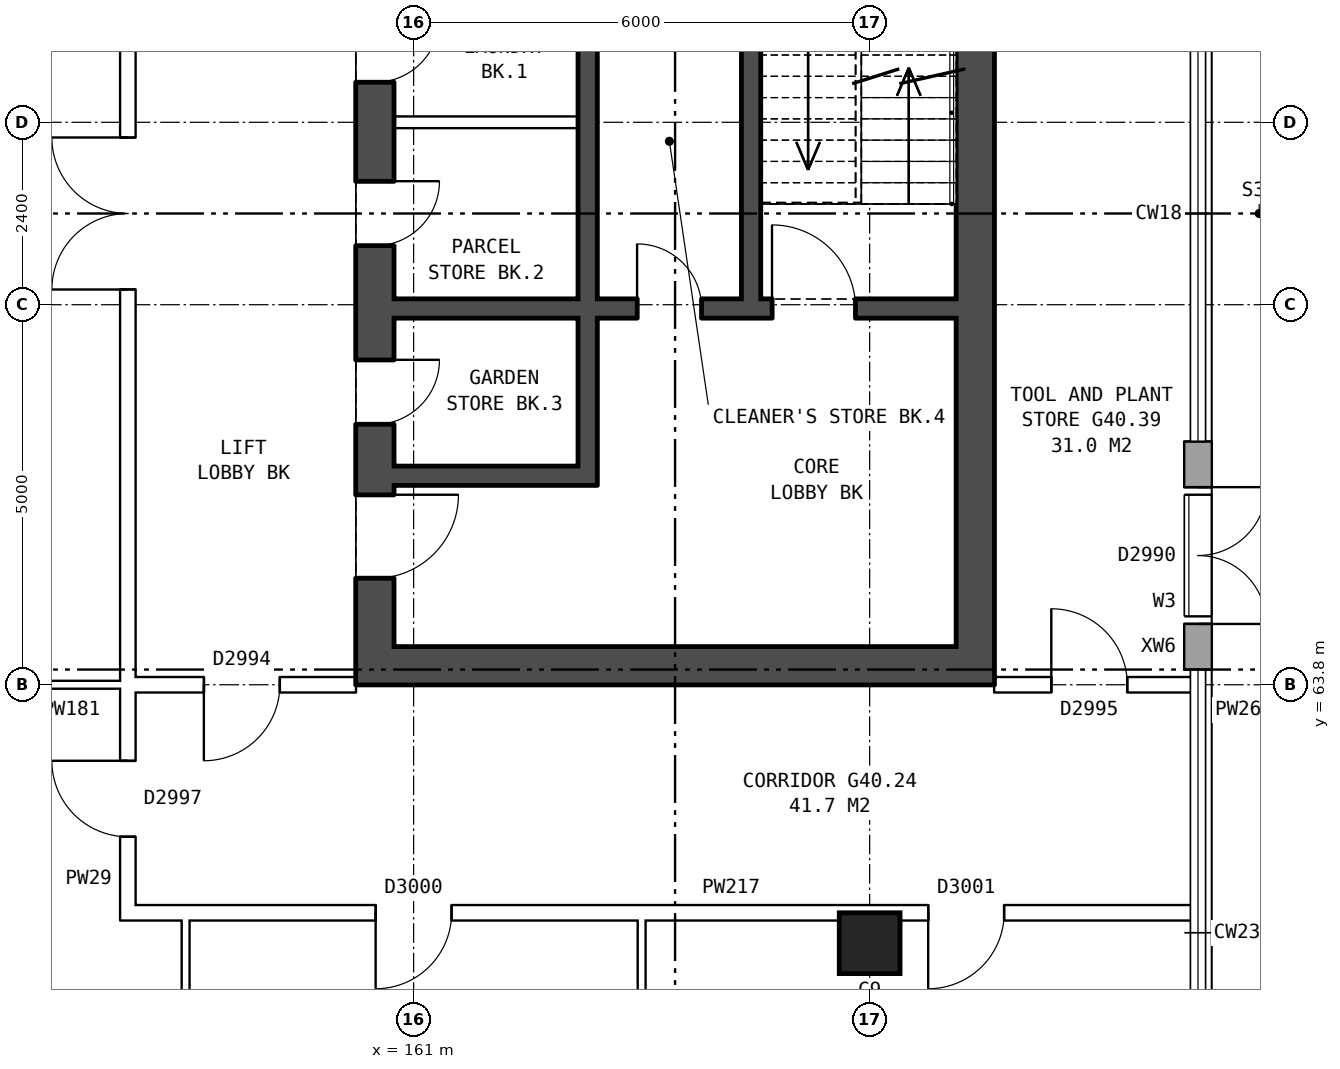
"""IFC4 building model, lengths in metres.
Left out: names, types, materials, properties, quantities, classifications, styles, units other than length and angle.
Written with IfcOpenShell. Run it as: python <this file> out.ifc"""

import sys

from ifc_helpers import new_model, si_unit, direction, frame, frame_2d, origin, origin_2d, place, context, subcontext, project, spatial, rectangle, extrude, element, fill, save


model = new_model("IFC4")
c1 = context("Model", 3, precision=1e-05, world=origin(), true_north=direction((0.0, 1.0)))
c2 = subcontext(c1, "Body", "Model", "MODEL_VIEW")
j1 = project(units=[si_unit("LENGTHUNIT", "METRE"), si_unit("PLANEANGLEUNIT", "RADIAN")], contexts=[c1])
p1 = place(None, origin())
s1 = spatial("IfcSite", under=j1, at=p1, CompositionType="ELEMENT")
p2 = place(p1, origin())
s2 = spatial("IfcBuilding", under=s1, at=p2, CompositionType="ELEMENT")
p3 = place(p2, frame((0.0, 0.0, 142.3)))
s3 = spatial("IfcBuildingStorey", under=s2, at=p3, CompositionType="ELEMENT", Elevation=142.3)
p4 = place(p3, frame((167.0, 60.4, 0.0), z_axis=(0.0, 0.0, 1.0), x_axis=(1.0, 0.0, 0.0)))
e1 = element("IfcColumn", 1, at=p4, inside=s3, PredefinedType="COLUMN", context=c2, shape_type="SweptSolid", body=[
    extrude(rectangle(XDim=0.8, YDim=0.8, at=origin_2d()), origin(), (0.0, 0.0, 1.0), 5.6),
])
p5 = place(p3, frame((171.32, 64.0, 0.0), z_axis=(0.0, 0.0, 1.0), x_axis=(0.0, 1.0, 0.0)))
e2 = element("IfcWall", 2, at=p5, inside=s3, PredefinedType="STANDARD", context=c2, shape_type="SweptSolid", body=[
    extrude(rectangle(XDim=3.0, YDim=0.36, at=frame_2d((1.5, 0.0))), origin(), (0.0, 0.0, 1.0), 5.6),
])
p6 = place(p5, frame((0.7, 0.0, 3.4)))
e3 = element("IfcOpeningElement", 3, at=p6, cuts=e2, PredefinedType="OPENING", context=c2, shape_type="SweptSolid", body=[
    extrude(rectangle(XDim=1.6, YDim=1.2, at=frame_2d((0.8, 0.6))), frame((0.0, 0.19, 0.0), z_axis=(0.0, -1.0, 0.0), x_axis=(1.0, 0.0, 0.0)), (0.0, 0.0, 1.0), 0.38),
])
p7 = place(p5, frame((0.6, 0.0, 0.0)))
e4 = element("IfcOpeningElement", 4, at=p7, cuts=e2, PredefinedType="OPENING", context=c2, shape_type="SweptSolid", body=[
    extrude(rectangle(XDim=1.8, YDim=2.4, at=frame_2d((0.9, 1.2))), frame((0.0, 0.19, 0.0), z_axis=(0.0, -1.0, 0.0), x_axis=(1.0, 0.0, 0.0)), (0.0, 0.0, 1.0), 0.38),
])
p8 = place(p3, frame((160.49, 76.2, 0.0), z_axis=(0.0, 0.0, 1.0), x_axis=(0.0, -1.0, 0.0)))
e5 = element("IfcWall", 5, at=p8, inside=s3, PredefinedType="SHEAR", context=c2, shape_type="SweptSolid", body=[
    extrude(rectangle(XDim=12.4, YDim=0.5, at=frame_2d((6.2, 0.0))), origin(), (0.0, 0.0, 1.0), 5.6),
])
p9 = place(p8, frame((1.325, 0.0, 0.0)))
e6 = element("IfcOpeningElement", 6, at=p9, cuts=e5, PredefinedType="OPENING", context=c2, shape_type="SweptSolid", body=[
    extrude(rectangle(XDim=1.1, YDim=2.1, at=frame_2d((0.55, 1.05))), frame((0.0, 0.26, 0.0), z_axis=(0.0, -1.0, 0.0), x_axis=(1.0, 0.0, 0.0)), (0.0, 0.0, 1.0), 0.52),
])
p10 = place(p8, frame((3.625, 0.0, 0.0)))
e7 = element("IfcOpeningElement", 7, at=p10, cuts=e5, PredefinedType="OPENING", context=c2, shape_type="SweptSolid", body=[
    extrude(rectangle(XDim=0.85, YDim=2.1, at=frame_2d((0.425, 1.05))), frame((0.0, 0.26, 0.0), z_axis=(0.0, -1.0, 0.0), x_axis=(1.0, 0.0, 0.0)), (0.0, 0.0, 1.0), 0.52),
])
p11 = place(p8, frame((5.775, 0.0, 0.0)))
e8 = element("IfcOpeningElement", 8, at=p11, cuts=e5, PredefinedType="OPENING", context=c2, shape_type="SweptSolid", body=[
    extrude(rectangle(XDim=0.85, YDim=2.1, at=frame_2d((0.425, 1.05))), frame((0.0, 0.26, 0.0), z_axis=(0.0, -1.0, 0.0), x_axis=(1.0, 0.0, 0.0)), (0.0, 0.0, 1.0), 0.52),
])
p12 = place(p8, frame((9.9, 0.0, 0.0)))
e9 = element("IfcOpeningElement", 9, at=p12, cuts=e5, PredefinedType="OPENING", context=c2, shape_type="SweptSolid", body=[
    extrude(rectangle(XDim=1.1, YDim=2.1, at=frame_2d((0.55, 1.05))), frame((0.0, 0.26, 0.0), z_axis=(0.0, -1.0, 0.0), x_axis=(1.0, 0.0, 0.0)), (0.0, 0.0, 1.0), 0.52),
])
p13 = place(p8, frame((8.125, 0.0, 0.0)))
e10 = element("IfcOpeningElement", 10, at=p13, cuts=e5, PredefinedType="OPENING", context=c2, shape_type="SweptSolid", body=[
    extrude(rectangle(XDim=0.85, YDim=2.1, at=frame_2d((0.425, 1.05))), frame((0.0, 0.26, 0.0), z_axis=(0.0, -1.0, 0.0), x_axis=(1.0, 0.0, 0.0)), (0.0, 0.0, 1.0), 0.52),
])
p14 = place(p3, frame((168.39, 76.2, 0.0), z_axis=(0.0, 0.0, 1.0), x_axis=(0.0, -1.0, 0.0)))
e11 = element("IfcWall", 11, at=p14, inside=s3, PredefinedType="SHEAR", context=c2, shape_type="SweptSolid", body=[
    extrude(rectangle(XDim=12.4, YDim=0.5, at=frame_2d((6.2, 0.0))), origin(), (0.0, 0.0, 1.0), 5.6),
])
p15 = place(p3, frame((160.74, 64.05, 0.0), z_axis=(0.0, 0.0, 1.0), x_axis=(1.0, 0.0, 0.0)))
e12 = element("IfcWall", 12, at=p15, inside=s3, PredefinedType="SHEAR", context=c2, shape_type="SweptSolid", body=[
    extrude(rectangle(XDim=7.4, YDim=0.5, at=frame_2d((3.7, 0.0))), origin(), (0.0, 0.0, 1.0), 5.6),
])
p16 = place(p3, frame((160.74, 71.2, 0.0), z_axis=(0.0, 0.0, 1.0), x_axis=(1.0, 0.0, 0.0)))
e13 = element("IfcWall", 13, at=p16, inside=s3, PredefinedType="PARTITIONING", context=c2, shape_type="SweptSolid", body=[
    extrude(rectangle(XDim=2.425, YDim=0.15, at=frame_2d((1.212, 0.0))), origin(), (0.0, 0.0, 1.0), 5.6),
])
p17 = place(p3, frame((160.74, 68.75, 0.0), z_axis=(0.0, 0.0, 1.0), x_axis=(1.0, 0.0, 0.0)))
e14 = element("IfcWall", 14, at=p17, inside=s3, PredefinedType="SHEAR", context=c2, shape_type="SweptSolid", body=[
    extrude(rectangle(XDim=7.4, YDim=0.25, at=frame_2d((3.7, 0.0))), origin(), (0.0, 0.0, 1.0), 5.6),
])
p18 = place(p17, frame((4.975, 0.0, 0.0)))
e15 = element("IfcOpeningElement", 15, at=p18, cuts=e14, PredefinedType="OPENING", context=c2, shape_type="SweptSolid", body=[
    extrude(rectangle(XDim=1.1, YDim=2.1, at=frame_2d((0.55, 1.05))), frame((0.0, 0.135, 0.0), z_axis=(0.0, -1.0, 0.0), x_axis=(1.0, 0.0, 0.0)), (0.0, 0.0, 1.0), 0.27),
])
p19 = place(p17, frame((3.2, 0.0, 0.0)))
e16 = element("IfcOpeningElement", 16, at=p19, cuts=e14, PredefinedType="OPENING", context=c2, shape_type="SweptSolid", body=[
    extrude(rectangle(XDim=0.85, YDim=2.1, at=frame_2d((0.425, 1.05))), frame((0.0, 0.135, 0.0), z_axis=(0.0, -1.0, 0.0), x_axis=(1.0, 0.0, 0.0)), (0.0, 0.0, 1.0), 0.27),
])
p20 = place(p3, frame((160.74, 66.55, 0.0), z_axis=(0.0, 0.0, 1.0), x_axis=(1.0, 0.0, 0.0)))
e17 = element("IfcWall", 17, at=p20, inside=s3, PredefinedType="SHEAR", context=c2, shape_type="SweptSolid", body=[
    extrude(rectangle(XDim=2.425, YDim=0.25, at=frame_2d((1.212, 0.0))), origin(), (0.0, 0.0, 1.0), 5.6),
])
p21 = place(p3, frame((163.29, 73.025, 0.0), z_axis=(0.0, 0.0, 1.0), x_axis=(0.0, -1.0, 0.0)))
e18 = element("IfcWall", 18, at=p21, inside=s3, PredefinedType="SHEAR", context=c2, shape_type="SweptSolid", body=[
    extrude(rectangle(XDim=4.15, YDim=0.25, at=frame_2d((2.075, 0.0))), origin(), (0.0, 0.0, 1.0), 5.6),
])
p22 = place(p3, frame((163.29, 68.625, 0.0), z_axis=(0.0, 0.0, 1.0), x_axis=(0.0, -1.0, 0.0)))
e19 = element("IfcWall", 19, at=p22, inside=s3, PredefinedType="SHEAR", context=c2, shape_type="SweptSolid", body=[
    extrude(rectangle(XDim=2.2, YDim=0.25, at=frame_2d((1.1, 0.0))), origin(), (0.0, 0.0, 1.0), 5.6),
])
p23 = place(p3, frame((165.44, 75.7, 0.0), z_axis=(0.0, 0.0, 1.0), x_axis=(0.0, -1.0, 0.0)))
e20 = element("IfcWall", 20, at=p23, inside=s3, PredefinedType="SHEAR", context=c2, shape_type="SweptSolid", body=[
    extrude(rectangle(XDim=6.825, YDim=0.25, at=frame_2d((3.413, 0.0))), origin(), (0.0, 0.0, 1.0), 5.6),
])
p24 = place(p3, frame((157.24, 63.9, 0.0), z_axis=(0.0, 0.0, 1.0), x_axis=(0.0, 1.0, 0.0)))
e21 = element("IfcWall", 21, at=p24, inside=s3, PredefinedType="PARTITIONING", context=c2, shape_type="SweptSolid", body=[
    extrude(rectangle(XDim=12.2, YDim=0.2, at=frame_2d((6.1, 0.0))), origin(), (0.0, 0.0, 1.0), 5.6),
])
p25 = place(p24, frame((5.1, 0.0, 0.0)))
e22 = element("IfcOpeningElement", 22, at=p25, cuts=e21, PredefinedType="OPENING", context=c2, shape_type="SweptSolid", body=[
    extrude(rectangle(XDim=2.0, YDim=2.1, at=frame_2d((1.0, 1.05))), frame((0.0, 0.11, 0.0), z_axis=(0.0, -1.0, 0.0), x_axis=(1.0, 0.0, 0.0)), (0.0, 0.0, 1.0), 0.22),
])
p26 = place(p3, frame((157.14, 60.8, 0.0), z_axis=(0.0, 0.0, 1.0), x_axis=(1.0, 0.0, 0.0)))
e23 = element("IfcWall", 23, at=p26, inside=s3, PredefinedType="PARTITIONING", context=c2, shape_type="SweptSolid", body=[
    extrude(rectangle(XDim=14.12, YDim=0.2, at=frame_2d((7.06, 0.0))), origin(), (0.0, 0.0, 1.0), 5.6),
])
p27 = place(p26, frame((3.36, 0.0, 0.0)))
e24 = element("IfcOpeningElement", 24, at=p27, cuts=e23, PredefinedType="OPENING", context=c2, shape_type="SweptSolid", body=[
    extrude(rectangle(XDim=1.0, YDim=2.1, at=frame_2d((0.5, 1.05))), frame((0.0, 0.11, 0.0), z_axis=(0.0, -1.0, 0.0), x_axis=(1.0, 0.0, 0.0)), (0.0, 0.0, 1.0), 0.22),
])
p28 = place(p26, frame((10.63, 0.0, 0.0)))
e25 = element("IfcOpeningElement", 25, at=p28, cuts=e23, PredefinedType="OPENING", context=c2, shape_type="SweptSolid", body=[
    extrude(rectangle(XDim=1.0, YDim=2.1, at=frame_2d((0.5, 1.05))), frame((0.0, 0.11, 0.0), z_axis=(0.0, -1.0, 0.0), x_axis=(1.0, 0.0, 0.0)), (0.0, 0.0, 1.0), 0.22),
])
p29 = place(p3, frame((168.64, 63.8, 0.0), z_axis=(0.0, 0.0, 1.0), x_axis=(1.0, 0.0, 0.0)))
e26 = element("IfcWall", 26, at=p29, inside=s3, PredefinedType="PARTITIONING", context=c2, shape_type="SweptSolid", body=[
    extrude(rectangle(XDim=2.62, YDim=0.2, at=frame_2d((1.31, 0.0))), origin(), (0.0, 0.0, 1.0), 5.6),
])
p30 = place(p29, frame((0.75, 0.0, 0.0)))
e27 = element("IfcOpeningElement", 27, at=p30, cuts=e26, PredefinedType="OPENING", context=c2, shape_type="SweptSolid", body=[
    extrude(rectangle(XDim=1.0, YDim=2.1, at=frame_2d((0.5, 1.05))), frame((0.0, 0.11, 0.0), z_axis=(0.0, -1.0, 0.0), x_axis=(1.0, 0.0, 0.0)), (0.0, 0.0, 1.0), 0.22),
])
p31 = place(p3, frame((157.14, 63.8, 0.0), z_axis=(0.0, 0.0, 1.0), x_axis=(1.0, 0.0, 0.0)))
e28 = element("IfcWall", 28, at=p31, inside=s3, PredefinedType="PARTITIONING", context=c2, shape_type="SweptSolid", body=[
    extrude(rectangle(XDim=3.1, YDim=0.2, at=frame_2d((1.55, 0.0))), origin(), (0.0, 0.0, 1.0), 5.6),
])
p32 = place(p31, frame((1.1, 0.0, 0.0)))
e29 = element("IfcOpeningElement", 29, at=p32, cuts=e28, PredefinedType="OPENING", context=c2, shape_type="SweptSolid", body=[
    extrude(rectangle(XDim=1.0, YDim=2.1, at=frame_2d((0.5, 1.05))), frame((0.0, 0.11, 0.0), z_axis=(0.0, -1.0, 0.0), x_axis=(1.0, 0.0, 0.0)), (0.0, 0.0, 1.0), 0.22),
])
p33 = place(p3, frame((142.66, 63.8, 0.0), z_axis=(0.0, 0.0, 1.0), x_axis=(1.0, 0.0, 0.0)))
e30 = element("IfcWall", 30, at=p33, inside=s3, PredefinedType="PARTITIONING", context=c2, shape_type="SweptSolid", body=[
    extrude(rectangle(XDim=14.68, YDim=0.1, at=frame_2d((7.34, 0.0))), origin(), (0.0, 0.0, 1.0), 5.6),
])
p34 = place(p33, frame((3.22, 0.0, 0.0)))
e31 = element("IfcOpeningElement", 31, at=p34, cuts=e30, PredefinedType="OPENING", context=c2, shape_type="SweptSolid", body=[
    extrude(rectangle(XDim=1.0, YDim=2.1, at=frame_2d((0.5, 1.05))), frame((0.0, 0.06, 0.0), z_axis=(0.0, -1.0, 0.0), x_axis=(1.0, 0.0, 0.0)), (0.0, 0.0, 1.0), 0.12),
])
p35 = place(p33, frame((10.46, 0.0, 0.0)))
e32 = element("IfcOpeningElement", 32, at=p35, cuts=e30, PredefinedType="OPENING", context=c2, shape_type="SweptSolid", body=[
    extrude(rectangle(XDim=1.0, YDim=2.1, at=frame_2d((0.5, 1.05))), frame((0.0, 0.06, 0.0), z_axis=(0.0, -1.0, 0.0), x_axis=(1.0, 0.0, 0.0)), (0.0, 0.0, 1.0), 0.12),
])
p36 = place(p3, frame((157.24, 60.7, 0.0), z_axis=(0.0, 0.0, 1.0), x_axis=(0.0, 1.0, 0.0)))
e33 = element("IfcWall", 33, at=p36, inside=s3, PredefinedType="PARTITIONING", context=c2, shape_type="SweptSolid", body=[
    extrude(rectangle(XDim=3.2, YDim=0.2, at=frame_2d((1.6, 0.0))), origin(), (0.0, 0.0, 1.0), 5.6),
])
p37 = place(p36, frame((1.1, 0.0, 0.0)))
e34 = element("IfcOpeningElement", 34, at=p37, cuts=e33, PredefinedType="OPENING", context=c2, shape_type="SweptSolid", body=[
    extrude(rectangle(XDim=1.0, YDim=2.1, at=frame_2d((0.5, 1.05))), frame((0.0, 0.11, 0.0), z_axis=(0.0, -1.0, 0.0), x_axis=(1.0, 0.0, 0.0)), (0.0, 0.0, 1.0), 0.22),
])
for number, where, z_axis, x_axis in (
    (35, (158.0, 54.24, 0.0), (0.0, 0.0, 1.0), (0.0, 1.0, 0.0)),
    (36, (164.0, 54.24, 0.0), (0.0, 0.0, 1.0), (0.0, 1.0, 0.0)),
):
    element("IfcWall", number, at=place(p3, frame(where, z_axis=z_axis, x_axis=x_axis)), inside=s3, PredefinedType="PARTITIONING", context=c2, shape_type="SweptSolid", body=[
        extrude(rectangle(XDim=6.66, YDim=0.1, at=frame_2d((3.33, 0.0))), origin(), (0.0, 0.0, 1.0), 5.6),
    ])
p38 = place(p6, origin())
e37 = element("IfcWindow", 37, at=p38, inside=s3, PartitioningType="DOUBLE_PANEL_HORIZONTAL", PredefinedType="WINDOW", context=c2, shape_type="SweptSolid", body=[
    extrude(rectangle(XDim=1.6, YDim=1.2, at=frame_2d((0.8, 0.6))), frame((0.0, 0.15, 0.0), z_axis=(0.0, -1.0, 0.0), x_axis=(1.0, 0.0, 0.0)), (0.0, 0.0, 1.0), 0.06),
])
fill(e3, e37)
p39 = place(p7, frame((1.8, 0.0, 0.0), z_axis=(0.0, 0.0, 1.0), x_axis=(-1.0, 0.0, 0.0)))
e38 = element("IfcDoor", 38, at=p39, inside=s3, OperationType="DOUBLE_DOOR_SINGLE_SWING", PredefinedType="DOOR", context=c2, shape_type="SweptSolid", body=[
    extrude(rectangle(XDim=1.8, YDim=2.4, at=frame_2d((0.9, 1.2))), frame((0.0, 0.025, 0.0), z_axis=(0.0, -1.0, 0.0), x_axis=(1.0, 0.0, 0.0)), (0.0, 0.0, 1.0), 0.05),
])
fill(e4, e38)
p40 = place(p10, origin())
e39 = element("IfcDoor", 39, at=p40, inside=s3, OperationType="SINGLE_SWING_LEFT", PredefinedType="DOOR", context=c2, shape_type="SweptSolid", body=[
    extrude(rectangle(XDim=0.85, YDim=2.1, at=frame_2d((0.425, 1.05))), frame((0.0, 0.235, 0.0), z_axis=(0.0, -1.0, 0.0), x_axis=(1.0, 0.0, 0.0)), (0.0, 0.0, 1.0), 0.05),
])
fill(e7, e39)
p41 = place(p11, origin())
e40 = element("IfcDoor", 40, at=p41, inside=s3, OperationType="SINGLE_SWING_LEFT", PredefinedType="DOOR", context=c2, shape_type="SweptSolid", body=[
    extrude(rectangle(XDim=0.85, YDim=2.1, at=frame_2d((0.425, 1.05))), frame((0.0, 0.235, 0.0), z_axis=(0.0, -1.0, 0.0), x_axis=(1.0, 0.0, 0.0)), (0.0, 0.0, 1.0), 0.05),
])
fill(e8, e40)
p42 = place(p12, origin())
e41 = element("IfcDoor", 41, at=p42, inside=s3, OperationType="SINGLE_SWING_LEFT", PredefinedType="DOOR", context=c2, shape_type="SweptSolid", body=[
    extrude(rectangle(XDim=1.1, YDim=2.1, at=frame_2d((0.55, 1.05))), frame((0.0, 0.235, 0.0), z_axis=(0.0, -1.0, 0.0), x_axis=(1.0, 0.0, 0.0)), (0.0, 0.0, 1.0), 0.05),
])
fill(e9, e41)
p43 = place(p18, origin())
e42 = element("IfcDoor", 42, at=p43, inside=s3, OperationType="SINGLE_SWING_LEFT", PredefinedType="DOOR", context=c2, shape_type="SweptSolid", body=[
    extrude(rectangle(XDim=1.1, YDim=2.1, at=frame_2d((0.55, 1.05))), frame((0.0, 0.025, 0.0), z_axis=(0.0, -1.0, 0.0), x_axis=(1.0, 0.0, 0.0)), (0.0, 0.0, 1.0), 0.05),
])
fill(e15, e42)
p44 = place(p13, origin())
e43 = element("IfcDoor", 43, at=p44, inside=s3, OperationType="SINGLE_SWING_LEFT", PredefinedType="DOOR", context=c2, shape_type="SweptSolid", body=[
    extrude(rectangle(XDim=0.85, YDim=2.1, at=frame_2d((0.425, 1.05))), frame((0.0, 0.235, 0.0), z_axis=(0.0, -1.0, 0.0), x_axis=(1.0, 0.0, 0.0)), (0.0, 0.0, 1.0), 0.05),
])
fill(e10, e43)
p45 = place(p19, origin())
e44 = element("IfcDoor", 44, at=p45, inside=s3, OperationType="SINGLE_SWING_LEFT", PredefinedType="DOOR", context=c2, shape_type="SweptSolid", body=[
    extrude(rectangle(XDim=0.85, YDim=2.1, at=frame_2d((0.425, 1.05))), frame((0.0, 0.025, 0.0), z_axis=(0.0, -1.0, 0.0), x_axis=(1.0, 0.0, 0.0)), (0.0, 0.0, 1.0), 0.05),
])
fill(e16, e44)
p46 = place(p25, origin())
e45 = element("IfcDoor", 45, at=p46, inside=s3, OperationType="DOUBLE_DOOR_SINGLE_SWING", PredefinedType="DOOR", context=c2, shape_type="SweptSolid", body=[
    extrude(rectangle(XDim=2.0, YDim=2.1, at=frame_2d((1.0, 1.05))), frame((0.0, 0.025, 0.0), z_axis=(0.0, -1.0, 0.0), x_axis=(1.0, 0.0, 0.0)), (0.0, 0.0, 1.0), 0.05),
])
fill(e22, e45)
p47 = place(p27, frame((1.0, 0.0, 0.0), z_axis=(0.0, 0.0, 1.0), x_axis=(-1.0, 0.0, 0.0)))
e46 = element("IfcDoor", 46, at=p47, inside=s3, OperationType="SINGLE_SWING_RIGHT", PredefinedType="DOOR", context=c2, shape_type="SweptSolid", body=[
    extrude(rectangle(XDim=1.0, YDim=2.1, at=frame_2d((0.5, 1.05))), frame((0.0, 0.025, 0.0), z_axis=(0.0, -1.0, 0.0), x_axis=(1.0, 0.0, 0.0)), (0.0, 0.0, 1.0), 0.05),
])
fill(e24, e46)
p48 = place(p28, frame((1.0, 0.0, 0.0), z_axis=(0.0, 0.0, 1.0), x_axis=(-1.0, 0.0, 0.0)))
e47 = element("IfcDoor", 47, at=p48, inside=s3, OperationType="SINGLE_SWING_RIGHT", PredefinedType="DOOR", context=c2, shape_type="SweptSolid", body=[
    extrude(rectangle(XDim=1.0, YDim=2.1, at=frame_2d((0.5, 1.05))), frame((0.0, 0.025, 0.0), z_axis=(0.0, -1.0, 0.0), x_axis=(1.0, 0.0, 0.0)), (0.0, 0.0, 1.0), 0.05),
])
fill(e25, e47)
p49 = place(p30, origin())
e48 = element("IfcDoor", 48, at=p49, inside=s3, OperationType="SINGLE_SWING_LEFT", PredefinedType="DOOR", context=c2, shape_type="SweptSolid", body=[
    extrude(rectangle(XDim=1.0, YDim=2.1, at=frame_2d((0.5, 1.05))), frame((0.0, 0.025, 0.0), z_axis=(0.0, -1.0, 0.0), x_axis=(1.0, 0.0, 0.0)), (0.0, 0.0, 1.0), 0.05),
])
fill(e27, e48)
p50 = place(p32, frame((1.0, 0.0, 0.0), z_axis=(0.0, 0.0, 1.0), x_axis=(-1.0, 0.0, 0.0)))
e49 = element("IfcDoor", 49, at=p50, inside=s3, OperationType="SINGLE_SWING_RIGHT", PredefinedType="DOOR", context=c2, shape_type="SweptSolid", body=[
    extrude(rectangle(XDim=1.0, YDim=2.1, at=frame_2d((0.5, 1.05))), frame((0.0, 0.025, 0.0), z_axis=(0.0, -1.0, 0.0), x_axis=(1.0, 0.0, 0.0)), (0.0, 0.0, 1.0), 0.05),
])
fill(e29, e49)
p51 = place(p37, origin())
e50 = element("IfcDoor", 50, at=p51, inside=s3, OperationType="SINGLE_SWING_RIGHT", PredefinedType="DOOR", context=c2, shape_type="SweptSolid", body=[
    extrude(rectangle(XDim=1.0, YDim=2.1, at=frame_2d((0.5, 1.05))), frame((0.0, 0.025, 0.0), z_axis=(0.0, -1.0, 0.0), x_axis=(1.0, 0.0, 0.0)), (0.0, 0.0, 1.0), 0.05),
])
fill(e34, e50)
save(model, sys.argv[1])
